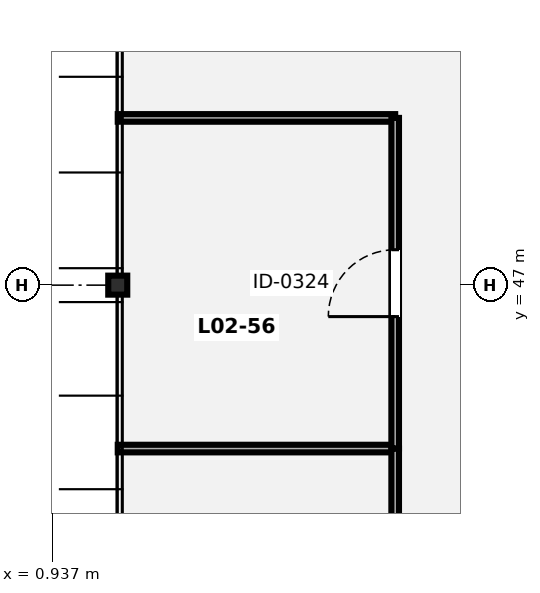
"""IFC4 building model, lengths in metres.
Left out: names, types, materials, properties, quantities, classifications, styles, units other than length and angle.
Written with IfcOpenShell. Run it as: python <this file> out.ifc"""

import sys

from ifc_helpers import new_model, si_unit, direction, frame, frame_2d, origin, origin_2d, place, context, subcontext, project, spatial, rectangle, hollow_rectangle, extrude, element, fill, save


model = new_model("IFC4")
c1 = context("Model", 3, precision=1e-05, world=origin(), true_north=direction((0.0, 1.0)))
c2 = subcontext(c1, "Body", "Model", "MODEL_VIEW")
j1 = project(units=[si_unit("LENGTHUNIT", "METRE"), si_unit("PLANEANGLEUNIT", "RADIAN")], contexts=[c1])
p1 = place(None, origin())
s1 = spatial("IfcSite", under=j1, at=p1, CompositionType="ELEMENT")
p2 = place(p1, origin())
s2 = spatial("IfcBuilding", under=s1, at=p2, CompositionType="ELEMENT")
p3 = place(p2, frame((0.0, 0.0, 9.1)))
s3 = spatial("IfcBuildingStorey", under=s2, at=p3, CompositionType="ELEMENT", Elevation=9.1)
p4 = place(p3, frame((1.8, 47.0, 0.0), z_axis=(0.0, 0.0, 1.0), x_axis=(1.0, 0.0, 0.0)))
e1 = element("IfcColumn", 1, at=p4, inside=s3, PredefinedType="COLUMN", context=c2, shape_type="SweptSolid", body=[
    extrude(hollow_rectangle(XDim=0.25, YDim=0.25, WallThickness=0.012, at=origin_2d()), origin(), (0.0, 0.0, 1.0), 4.2),
])
p5 = place(p3, frame((1.8, 44.85, 0.0), z_axis=(0.0, 0.0, 1.0), x_axis=(1.0, 0.0, 0.0)))
e2 = element("IfcWall", 2, at=p5, inside=s3, PredefinedType="PARTITIONING", context=c2, shape_type="SweptSolid", body=[
    extrude(rectangle(XDim=3.65, YDim=0.1, at=frame_2d((1.825, 0.0))), origin(), (0.0, 0.0, 1.0), 4.0),
])
p6 = place(p3, frame((5.45, 41.6, 0.0), z_axis=(0.0, 0.0, 1.0), x_axis=(0.0, 1.0, 0.0)))
e3 = element("IfcWall", 3, at=p6, inside=s3, PredefinedType="PARTITIONING", context=c2, shape_type="SweptSolid", body=[
    extrude(rectangle(XDim=3.25, YDim=0.1, at=frame_2d((1.625, 0.0))), origin(), (0.0, 0.0, 1.0), 4.0),
])
p7 = place(p6, frame((1.125, 0.0, 0.0)))
e4 = element("IfcOpeningElement", 4, at=p7, cuts=e3, PredefinedType="OPENING", context=c2, shape_type="SweptSolid", body=[
    extrude(rectangle(XDim=1.0, YDim=2.1, at=frame_2d((0.5, 1.05))), frame((0.0, 0.06, 0.0), z_axis=(0.0, -1.0, 0.0), x_axis=(1.0, 0.0, 0.0)), (0.0, 0.0, 1.0), 0.12),
])
p8 = place(p3, frame((1.8, 49.2, 0.0), z_axis=(0.0, 0.0, 1.0), x_axis=(1.0, 0.0, 0.0)))
e5 = element("IfcWall", 5, at=p8, inside=s3, PredefinedType="PARTITIONING", context=c2, shape_type="SweptSolid", body=[
    extrude(rectangle(XDim=3.65, YDim=0.1, at=frame_2d((1.825, 0.0))), origin(), (0.0, 0.0, 1.0), 4.0),
])
p9 = place(p3, frame((5.45, 44.852, 0.0), z_axis=(0.0, 0.0, 1.0), x_axis=(0.0, 1.0, 0.0)))
e6 = element("IfcWall", 6, at=p9, inside=s3, PredefinedType="PARTITIONING", context=c2, shape_type="SweptSolid", body=[
    extrude(rectangle(XDim=4.348, YDim=0.1, at=frame_2d((2.174, 0.0))), origin(), (0.0, 0.0, 1.0), 4.0),
])
p10 = place(p9, frame((1.734, 0.0, 0.0)))
e7 = element("IfcOpeningElement", 7, at=p10, cuts=e6, PredefinedType="OPENING", context=c2, shape_type="SweptSolid", body=[
    extrude(rectangle(XDim=0.88, YDim=2.08, at=frame_2d((0.44, 1.04))), frame((0.0, 0.06, 0.0), z_axis=(0.0, -1.0, 0.0), x_axis=(1.0, 0.0, 0.0)), (0.0, 0.0, 1.0), 0.12),
])
p11 = place(p10, origin())
e8 = element("IfcDoor", 8, at=p11, inside=s3, OperationType="SINGLE_SWING_LEFT", PredefinedType="DOOR", context=c2, shape_type="SweptSolid", body=[
    extrude(rectangle(XDim=0.88, YDim=2.08, at=frame_2d((0.44, 1.04))), frame((0.0, 0.025, 0.0), z_axis=(0.0, -1.0, 0.0), x_axis=(1.0, 0.0, 0.0)), (0.0, 0.0, 1.0), 0.05),
])
fill(e7, e8)
save(model, sys.argv[1])
